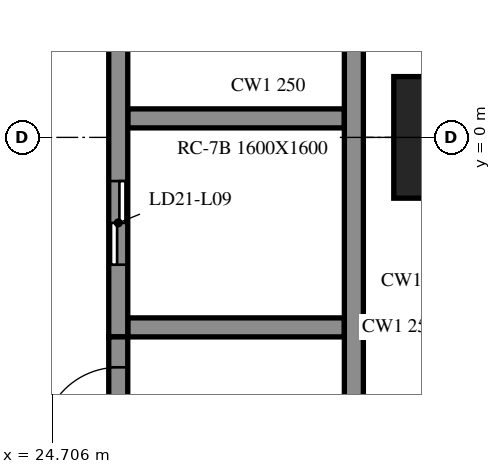
"""IFC4 building model, lengths in metres.
Left out: names, types, materials, properties, quantities, classifications, styles, units other than length and angle.
Written with IfcOpenShell. Run it as: python <this file> out.ifc"""

import sys

from ifc_helpers import new_model, si_unit, direction, frame, frame_2d, origin, origin_2d, place, context, subcontext, project, spatial, rectangle, extrude, element, fill, save


model = new_model("IFC4")
c1 = context("Model", 3, precision=1e-05, world=origin(), true_north=direction((0.0, 1.0)))
c2 = subcontext(c1, "Body", "Model", "MODEL_VIEW")
j1 = project(units=[si_unit("LENGTHUNIT", "METRE"), si_unit("PLANEANGLEUNIT", "RADIAN")], contexts=[c1])
p1 = place(None, origin())
s1 = spatial("IfcSite", under=j1, at=p1, CompositionType="ELEMENT")
p2 = place(p1, origin())
s2 = spatial("IfcBuilding", under=s1, at=p2, CompositionType="ELEMENT")
p3 = place(p2, frame((0.0, 0.0, 41.6)))
s3 = spatial("IfcBuildingStorey", under=s2, at=p3, CompositionType="ELEMENT", Elevation=41.6)
p4 = place(p3, frame((30.0, 0.0, -0.55), z_axis=(0.0, 0.0, 1.0), x_axis=(1.0, 0.0, 0.0)))
e1 = element("IfcColumn", 1, at=p4, inside=s3, PredefinedType="COLUMN", context=c2, shape_type="SweptSolid", body=[
    extrude(rectangle(XDim=1.6, YDim=1.6, at=origin_2d()), origin(), (0.0, 0.0, 1.0), 4.61),
])
p5 = place(p3, frame((28.675, -9.125, 0.0), z_axis=(0.0, 0.0, 1.0), x_axis=(0.0, 1.0, 0.0)))
e2 = element("IfcWall", 2, at=p5, inside=s3, PredefinedType="SOLIDWALL", context=c2, shape_type="SweptSolid", body=[
    extrude(rectangle(XDim=24.25, YDim=0.25, at=frame_2d((12.125, 0.0))), origin(), (0.0, 0.0, 1.0), 4.06),
])
p6 = place(p5, frame((13.075, 0.0, 0.0)))
e3 = element("IfcOpeningElement", 3, at=p6, cuts=e2, PredefinedType="OPENING", context=c2, shape_type="SweptSolid", body=[
    extrude(rectangle(XDim=0.9, YDim=2.1, at=frame_2d((0.45, 1.05))), frame((0.0, 0.135, 0.0), z_axis=(0.0, -1.0, 0.0), x_axis=(1.0, 0.0, 0.0)), (0.0, 0.0, 1.0), 0.27),
])
p7 = place(p5, frame((15.775, 0.0, 0.0)))
e4 = element("IfcOpeningElement", 4, at=p7, cuts=e2, PredefinedType="OPENING", context=c2, shape_type="SweptSolid", body=[
    extrude(rectangle(XDim=0.9, YDim=2.1, at=frame_2d((0.45, 1.05))), frame((0.0, 0.135, 0.0), z_axis=(0.0, -1.0, 0.0), x_axis=(1.0, 0.0, 0.0)), (0.0, 0.0, 1.0), 0.27),
])
p8 = place(p5, frame((18.925, 0.0, 0.0)))
e5 = element("IfcOpeningElement", 5, at=p8, cuts=e2, PredefinedType="OPENING", context=c2, shape_type="SweptSolid", body=[
    extrude(rectangle(XDim=0.9, YDim=2.1, at=frame_2d((0.45, 1.05))), frame((0.0, 0.135, 0.0), z_axis=(0.0, -1.0, 0.0), x_axis=(1.0, 0.0, 0.0)), (0.0, 0.0, 1.0), 0.27),
])
p9 = place(p5, frame((22.587, 0.0, 0.0)))
e6 = element("IfcOpeningElement", 6, at=p9, cuts=e2, PredefinedType="OPENING", context=c2, shape_type="SweptSolid", body=[
    extrude(rectangle(XDim=0.9, YDim=2.1, at=frame_2d((0.45, 1.05))), frame((0.0, 0.135, 0.0), z_axis=(0.0, -1.0, 0.0), x_axis=(1.0, 0.0, 0.0)), (0.0, 0.0, 1.0), 0.27),
])
p10 = place(p3, frame((25.575, -8.875, 0.0), z_axis=(0.0, 0.0, 1.0), x_axis=(0.0, 1.0, 0.0)))
e7 = element("IfcWall", 7, at=p10, inside=s3, PredefinedType="SOLIDWALL", context=c2, shape_type="SweptSolid", body=[
    extrude(rectangle(XDim=6.25, YDim=0.25, at=frame_2d((3.125, 0.0))), origin(), (0.0, 0.0, 1.0), 4.06),
])
p11 = place(p10, frame((4.85, 0.0, 0.0)))
e8 = element("IfcOpeningElement", 8, at=p11, cuts=e7, PredefinedType="OPENING", context=c2, shape_type="SweptSolid", body=[
    extrude(rectangle(XDim=1.0, YDim=2.1, at=frame_2d((0.5, 1.05))), frame((0.0, 0.135, 0.0), z_axis=(0.0, -1.0, 0.0), x_axis=(1.0, 0.0, 0.0)), (0.0, 0.0, 1.0), 0.27),
])
p12 = place(p3, frame((25.575, 14.875, 0.0), z_axis=(0.0, 0.0, 1.0), x_axis=(0.0, -1.0, 0.0)))
e9 = element("IfcWall", 9, at=p12, inside=s3, PredefinedType="SOLIDWALL", context=c2, shape_type="SweptSolid", body=[
    extrude(rectangle(XDim=17.5, YDim=0.25, at=frame_2d((8.75, 0.0))), origin(), (0.0, 0.0, 1.0), 4.06),
])
p13 = place(p12, frame((15.45, 0.0, 0.0)))
e10 = element("IfcOpeningElement", 10, at=p13, cuts=e9, PredefinedType="OPENING", context=c2, shape_type="SweptSolid", body=[
    extrude(rectangle(XDim=1.1, YDim=2.1, at=frame_2d((0.55, 1.05))), frame((0.0, 0.135, 0.0), z_axis=(0.0, -1.0, 0.0), x_axis=(1.0, 0.0, 0.0)), (0.0, 0.0, 1.0), 0.27),
])
p14 = place(p12, frame((12.8, 0.0, 0.0)))
e11 = element("IfcOpeningElement", 11, at=p14, cuts=e9, PredefinedType="OPENING", context=c2, shape_type="SweptSolid", body=[
    extrude(rectangle(XDim=0.9, YDim=2.1, at=frame_2d((0.45, 1.05))), frame((0.0, 0.135, 0.0), z_axis=(0.0, -1.0, 0.0), x_axis=(1.0, 0.0, 0.0)), (0.0, 0.0, 1.0), 0.27),
])
for number, where, z_axis, x_axis in (
    (12, (25.7, -2.5, 0.0), (0.0, 0.0, 1.0), (1.0, 0.0, 0.0)),
    (13, (25.7, 0.25, 0.0), (0.0, 0.0, 1.0), (1.0, 0.0, 0.0)),
):
    element("IfcWall", number, at=place(p3, frame(where, z_axis=z_axis, x_axis=x_axis)), inside=s3, PredefinedType="SOLIDWALL", context=c2, shape_type="SweptSolid", body=[
        extrude(rectangle(XDim=2.85, YDim=0.25, at=frame_2d((1.425, 0.0))), origin(), (0.0, 0.0, 1.0), 4.06),
    ])
p15 = place(p13, origin())
e14 = element("IfcDoor", 14, at=p15, inside=s3, OperationType="DOUBLE_DOOR_SLIDING", PredefinedType="DOOR", context=c2, shape_type="SweptSolid", body=[
    extrude(rectangle(XDim=1.1, YDim=2.1, at=frame_2d((0.55, 1.05))), frame((0.0, 0.025, 0.0), z_axis=(0.0, -1.0, 0.0), x_axis=(1.0, 0.0, 0.0)), (0.0, 0.0, 1.0), 0.05),
])
fill(e10, e14)
p16 = place(p11, origin())
e15 = element("IfcDoor", 15, at=p16, inside=s3, OperationType="SINGLE_SWING_LEFT", PredefinedType="DOOR", context=c2, shape_type="SweptSolid", body=[
    extrude(rectangle(XDim=1.0, YDim=2.1, at=frame_2d((0.5, 1.05))), frame((0.0, 0.025, 0.0), z_axis=(0.0, -1.0, 0.0), x_axis=(1.0, 0.0, 0.0)), (0.0, 0.0, 1.0), 0.05),
])
fill(e8, e15)
save(model, sys.argv[1])
